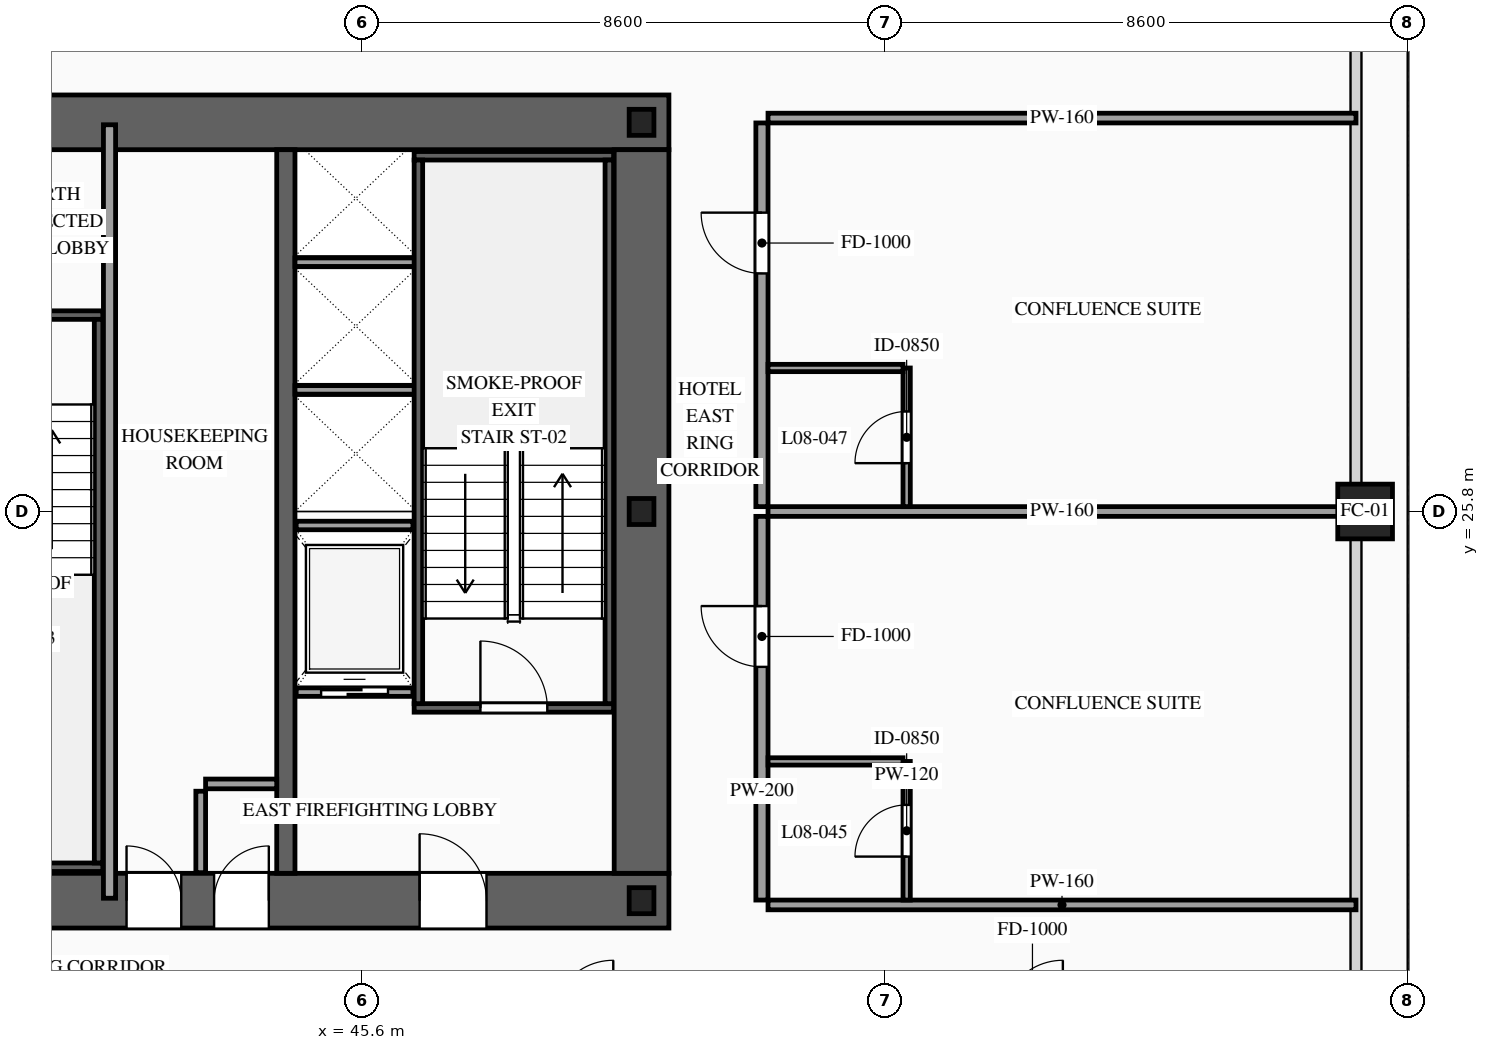
"""IFC4 building model, lengths in metres.
Left out: names, types, materials, properties, quantities, classifications, styles, units other than length and angle.
Written with IfcOpenShell. Run it as: python <this file> out.ifc"""

import sys

from ifc_helpers import new_model, si_unit, direction, frame, frame_2d, origin, origin_2d, place, context, subcontext, project, spatial, rectangle, hollow_rectangle, i_section, extrude, source, transform, mapped, element, fill, save


model = new_model("IFC4")
c1 = context("Model", 3, precision=1e-05, world=origin(), true_north=direction((0.0, 1.0)))
c2 = subcontext(c1, "Body", "Model", "MODEL_VIEW")
j1 = project(units=[si_unit("LENGTHUNIT", "METRE"), si_unit("PLANEANGLEUNIT", "RADIAN")], contexts=[c1])
p1 = place(None, origin())
s1 = spatial("IfcSite", under=j1, at=p1, CompositionType="ELEMENT")
p2 = place(p1, origin())
s2 = spatial("IfcBuilding", under=s1, at=p2, CompositionType="ELEMENT")
p3 = place(p2, frame((0.0, 0.0, 34.2)))
s3 = spatial("IfcBuildingStorey", under=s2, at=p3, CompositionType="ELEMENT", Elevation=34.2)
p4 = place(p3, frame((23.35, 19.4, 0.0), z_axis=(0.0, 0.0, 1.0), x_axis=(1.0, 0.0, 0.0)))
e1 = element("IfcWall", 1, at=p4, inside=s3, PredefinedType="SHEAR", context=c2, shape_type="SweptSolid", body=[
    extrude(rectangle(XDim=27.3, YDim=0.9, at=frame_2d((13.65, 0.0))), origin(), (0.0, 0.0, 1.0), 3.6),
])
p5 = place(p4, frame((2.1, 0.0, 0.0)))
e2 = element("IfcOpeningElement", 2, at=p5, cuts=e1, PredefinedType="OPENING", context=c2, shape_type="SweptSolid", body=[
    extrude(rectangle(XDim=1.1, YDim=2.2, at=frame_2d((0.55, 1.1))), frame((0.0, 0.465, 0.0), z_axis=(0.0, -1.0, 0.0), x_axis=(1.0, 0.0, 0.0)), (0.0, 0.0, 1.0), 0.93),
])
p6 = place(p4, frame((10.0, 0.0, 0.0)))
e3 = element("IfcOpeningElement", 3, at=p6, cuts=e1, PredefinedType="OPENING", context=c2, shape_type="SweptSolid", body=[
    extrude(rectangle(XDim=1.1, YDim=2.2, at=frame_2d((0.55, 1.1))), frame((0.0, 0.465, 0.0), z_axis=(0.0, -1.0, 0.0), x_axis=(1.0, 0.0, 0.0)), (0.0, 0.0, 1.0), 0.93),
])
p7 = place(p4, frame((23.2, 0.0, 0.0)))
e4 = element("IfcOpeningElement", 4, at=p7, cuts=e1, PredefinedType="OPENING", context=c2, shape_type="SweptSolid", body=[
    extrude(rectangle(XDim=1.1, YDim=2.2, at=frame_2d((0.55, 1.1))), frame((0.0, 0.465, 0.0), z_axis=(0.0, -1.0, 0.0), x_axis=(1.0, 0.0, 0.0)), (0.0, 0.0, 1.0), 0.93),
])
p8 = place(p4, frame((19.82, 0.0, 0.0)))
e5 = element("IfcOpeningElement", 5, at=p8, cuts=e1, PredefinedType="OPENING", context=c2, shape_type="SweptSolid", body=[
    extrude(rectangle(XDim=0.9, YDim=2.15, at=frame_2d((0.45, 1.075))), frame((0.0, 0.465, 0.0), z_axis=(0.0, -1.0, 0.0), x_axis=(1.0, 0.0, 0.0)), (0.0, 0.0, 1.0), 0.93),
])
p9 = place(p4, frame((18.38, 0.0, 0.0)))
e6 = element("IfcOpeningElement", 6, at=p9, cuts=e1, PredefinedType="OPENING", context=c2, shape_type="SweptSolid", body=[
    extrude(rectangle(XDim=0.9, YDim=2.15, at=frame_2d((0.45, 1.075))), frame((0.0, 0.465, 0.0), z_axis=(0.0, -1.0, 0.0), x_axis=(1.0, 0.0, 0.0)), (0.0, 0.0, 1.0), 0.93),
])
p10 = place(p3, frame((23.35, 32.2, 0.0), z_axis=(0.0, 0.0, 1.0), x_axis=(1.0, 0.0, 0.0)))
e7 = element("IfcWall", 7, at=p10, inside=s3, PredefinedType="SHEAR", context=c2, shape_type="SweptSolid", body=[
    extrude(rectangle(XDim=27.3, YDim=0.9, at=frame_2d((13.65, 0.0))), origin(), (0.0, 0.0, 1.0), 3.6),
])
p11 = place(p10, frame((4.72, 0.0, 0.0)))
e8 = element("IfcOpeningElement", 8, at=p11, cuts=e7, PredefinedType="OPENING", context=c2, shape_type="SweptSolid", body=[
    extrude(rectangle(XDim=0.9, YDim=2.15, at=frame_2d((0.45, 1.075))), frame((0.0, 0.465, 0.0), z_axis=(0.0, -1.0, 0.0), x_axis=(1.0, 0.0, 0.0)), (0.0, 0.0, 1.0), 0.93),
])
p12 = place(p10, frame((10.0, 0.0, 0.0)))
e9 = element("IfcOpeningElement", 9, at=p12, cuts=e7, PredefinedType="OPENING", context=c2, shape_type="SweptSolid", body=[
    extrude(rectangle(XDim=1.1, YDim=2.2, at=frame_2d((0.55, 1.1))), frame((0.0, 0.465, 0.0), z_axis=(0.0, -1.0, 0.0), x_axis=(1.0, 0.0, 0.0)), (0.0, 0.0, 1.0), 0.93),
])
p13 = place(p10, frame((15.85, 0.0, 0.0)))
e10 = element("IfcOpeningElement", 10, at=p13, cuts=e7, PredefinedType="OPENING", context=c2, shape_type="SweptSolid", body=[
    extrude(rectangle(XDim=1.1, YDim=2.2, at=frame_2d((0.55, 1.1))), frame((0.0, 0.465, 0.0), z_axis=(0.0, -1.0, 0.0), x_axis=(1.0, 0.0, 0.0)), (0.0, 0.0, 1.0), 0.93),
])
m1 = source(origin(), c2, "Body", "SweptSolid", [
    extrude(rectangle(XDim=11.9, YDim=0.9, at=frame_2d((5.95, 0.0))), origin(), (0.0, 0.0, 1.0), 3.6),
])
p14 = place(p3, frame((50.2, 19.85, 0.0), z_axis=(0.0, 0.0, 1.0), x_axis=(0.0, 1.0, 0.0)))
e11 = element("IfcWall", 11, at=p14, inside=s3, PredefinedType="SHEAR", context=c2, shape_type="MappedRepresentation", body=[
    mapped(m1, transform((0.0, 0.0, 0.0), scale=1.0)),
])
m2 = source(origin(), c2, "Body", "SweptSolid", [
    extrude(rectangle(XDim=11.9, YDim=0.3, at=frame_2d((5.95, 0.0))), origin(), (0.0, 0.0, 1.0), 3.6),
])
p15 = place(p3, frame((44.35, 19.85, 0.0), z_axis=(0.0, 0.0, 1.0), x_axis=(0.0, 1.0, 0.0)))
e12 = element("IfcWall", 12, at=p15, inside=s3, PredefinedType="SOLIDWALL", context=c2, shape_type="MappedRepresentation", body=[
    mapped(m2, transform((0.0, 0.0, 0.0), scale=1.0)),
])
m3 = source(origin(), c2, "Body", "SweptSolid", [
    extrude(i_section(OverallWidth=0.407, OverallDepth=0.428, WebThickness=0.02, FlangeThickness=0.035, at=origin_2d()), origin(), (0.0, 0.0, 1.0), 3.6),
])
for number, where, z_axis, x_axis in (
    (13, (50.2, 19.4, 0.0), (0.0, 0.0, 1.0), (1.0, 0.0, 0.0)),
    (14, (50.2, 25.8, 0.0), (0.0, 0.0, 1.0), (1.0, 0.0, 0.0)),
    (15, (50.2, 32.2, 0.0), (0.0, 0.0, 1.0), (1.0, 0.0, 0.0)),
):
    element("IfcColumn", number, at=place(p3, frame(where, z_axis=z_axis, x_axis=x_axis)), inside=s3, PredefinedType="COLUMN", context=c2, shape_type="MappedRepresentation", body=[
        mapped(m3, transform((0.0, 0.0, 0.0), scale=1.0)),
    ])
m4 = source(origin(), c2, "Body", "SweptSolid", [
    extrude(hollow_rectangle(XDim=0.9, YDim=0.9, WallThickness=0.042, at=origin_2d()), origin(), (0.0, 0.0, 1.0), 3.6),
])
p16 = place(p3, frame((62.1, 25.8, 0.0), z_axis=(0.0, 0.0, 1.0), x_axis=(1.0, 0.0, 0.0)))
e16 = element("IfcColumn", 16, at=p16, inside=s3, PredefinedType="COLUMN", context=c2, shape_type="MappedRepresentation", body=[
    mapped(m4, transform((0.0, 0.0, 0.0), scale=1.0)),
])
p17 = place(p3, frame((44.52, 22.83, 0.0), z_axis=(0.0, 0.0, 1.0), x_axis=(1.0, 0.0, 0.0)))
e17 = element("IfcWall", 17, at=p17, inside=s3, PredefinedType="SOLIDWALL", context=c2, shape_type="SweptSolid", body=[
    extrude(rectangle(XDim=1.92, YDim=0.14, at=frame_2d((0.96, 0.0))), origin(), (0.0, 0.0, 1.0), 3.38),
])
p18 = place(p17, frame((0.41, 0.0, 0.0)))
e18 = element("IfcOpeningElement", 18, at=p18, cuts=e17, PredefinedType="OPENING", context=c2, shape_type="SweptSolid", body=[
    extrude(rectangle(XDim=1.1, YDim=2.2, at=frame_2d((0.55, 1.1))), frame((0.0, 0.085, 0.0), z_axis=(0.0, -1.0, 0.0), x_axis=(1.0, 0.0, 0.0)), (0.0, 0.0, 1.0), 0.17),
])
m5 = source(origin(), c2, "Body", "SweptSolid", [
    extrude(rectangle(XDim=1.92, YDim=0.14, at=frame_2d((0.96, 0.0))), origin(), (0.0, 0.0, 1.0), 3.38),
])
p19 = place(p3, frame((44.52, 25.57, 0.0), z_axis=(0.0, 0.0, 1.0), x_axis=(1.0, 0.0, 0.0)))
e19 = element("IfcWall", 19, at=p19, inside=s3, PredefinedType="SOLIDWALL", context=c2, shape_type="MappedRepresentation", body=[
    mapped(m5, transform((0.0, 0.0, 0.0), scale=1.0)),
])
m6 = source(origin(), c2, "Body", "SweptSolid", [
    extrude(rectangle(XDim=2.0, YDim=0.14, at=frame_2d((1.0, 0.0))), origin(), (0.0, 0.0, 1.0), 3.38),
])
for number, where, z_axis, x_axis in (
    (20, (44.5, 27.8, 0.0), (0.0, 0.0, 1.0), (1.0, 0.0, 0.0)),
    (21, (44.5, 29.9, 0.0), (0.0, 0.0, 1.0), (1.0, 0.0, 0.0)),
):
    element("IfcWall", number, at=place(p3, frame(where, z_axis=z_axis, x_axis=x_axis)), inside=s3, PredefinedType="SOLIDWALL", context=c2, shape_type="MappedRepresentation", body=[
        mapped(m6, transform((0.0, 0.0, 0.0), scale=1.0)),
    ])
p20 = place(p3, frame((46.46, 22.57, 0.0), z_axis=(0.0, 0.0, 1.0), x_axis=(1.0, 0.0, 0.0)))
e22 = element("IfcWall", 22, at=p20, inside=s3, PredefinedType="SOLIDWALL", context=c2, shape_type="SweptSolid", body=[
    extrude(rectangle(XDim=3.28, YDim=0.14, at=frame_2d((1.64, 0.0))), origin(), (0.0, 0.0, 1.0), 3.38),
])
p21 = place(p20, frame((1.09, 0.0, 0.0)))
e23 = element("IfcOpeningElement", 23, at=p21, cuts=e22, PredefinedType="OPENING", context=c2, shape_type="SweptSolid", body=[
    extrude(rectangle(XDim=1.1, YDim=2.2, at=frame_2d((0.55, 1.1))), frame((0.0, 0.085, 0.0), z_axis=(0.0, -1.0, 0.0), x_axis=(1.0, 0.0, 0.0)), (0.0, 0.0, 1.0), 0.17),
])
m7 = source(origin(), c2, "Body", "SweptSolid", [
    extrude(rectangle(XDim=3.28, YDim=0.14, at=frame_2d((1.64, 0.0))), origin(), (0.0, 0.0, 1.0), 3.38),
])
p22 = place(p3, frame((46.46, 31.65, 0.0), z_axis=(0.0, 0.0, 1.0), x_axis=(1.0, 0.0, 0.0)))
e24 = element("IfcWall", 24, at=p22, inside=s3, PredefinedType="SOLIDWALL", context=c2, shape_type="MappedRepresentation", body=[
    mapped(m7, transform((0.0, 0.0, 0.0), scale=1.0)),
])
m8 = source(origin(), c2, "Body", "SweptSolid", [
    extrude(rectangle(XDim=8.94, YDim=0.14, at=frame_2d((4.47, 0.0))), origin(), (0.0, 0.0, 1.0), 3.38),
])
for number, where, z_axis, x_axis in (
    (25, (46.53, 22.64, 0.0), (0.0, 0.0, 1.0), (0.0, 1.0, 0.0)),
    (26, (49.67, 22.64, 0.0), (0.0, 0.0, 1.0), (0.0, 1.0, 0.0)),
):
    element("IfcWall", number, at=place(p3, frame(where, z_axis=z_axis, x_axis=x_axis)), inside=s3, PredefinedType="SOLIDWALL", context=c2, shape_type="MappedRepresentation", body=[
        mapped(m8, transform((0.0, 0.0, 0.0), scale=1.0)),
    ])
p23 = place(p3, frame((38.2, 29.03, 0.0), z_axis=(0.0, 0.0, 1.0), x_axis=(1.0, 0.0, 0.0)))
e27 = element("IfcWall", 27, at=p23, inside=s3, PredefinedType="SOLIDWALL", context=c2, shape_type="SweptSolid", body=[
    extrude(rectangle(XDim=3.14, YDim=0.14, at=frame_2d((1.57, 0.0))), origin(), (0.0, 0.0, 1.0), 3.38),
])
p24 = place(p23, frame((1.02, 0.0, 0.0)))
e28 = element("IfcOpeningElement", 28, at=p24, cuts=e27, PredefinedType="OPENING", context=c2, shape_type="SweptSolid", body=[
    extrude(rectangle(XDim=1.1, YDim=2.2, at=frame_2d((0.55, 1.1))), frame((0.0, 0.085, 0.0), z_axis=(0.0, -1.0, 0.0), x_axis=(1.0, 0.0, 0.0)), (0.0, 0.0, 1.0), 0.17),
])
m9 = source(origin(), c2, "Body", "SweptSolid", [
    extrude(rectangle(XDim=3.14, YDim=0.14, at=frame_2d((1.57, 0.0))), origin(), (0.0, 0.0, 1.0), 3.38),
])
p25 = place(p3, frame((38.2, 19.95, 0.0), z_axis=(0.0, 0.0, 1.0), x_axis=(1.0, 0.0, 0.0)))
e29 = element("IfcWall", 29, at=p25, inside=s3, PredefinedType="SOLIDWALL", context=c2, shape_type="MappedRepresentation", body=[
    mapped(m9, transform((0.0, 0.0, 0.0), scale=1.0)),
])
m10 = source(origin(), c2, "Body", "SweptSolid", [
    extrude(rectangle(XDim=8.94, YDim=0.14, at=frame_2d((4.47, 0.0))), origin(), (0.0, 0.0, 1.0), 3.38),
])
p26 = place(p3, frame((41.27, 20.02, 0.0), z_axis=(0.0, 0.0, 1.0), x_axis=(0.0, 1.0, 0.0)))
e30 = element("IfcWall", 30, at=p26, inside=s3, PredefinedType="SOLIDWALL", context=c2, shape_type="MappedRepresentation", body=[
    mapped(m10, transform((0.0, 0.0, 0.0), scale=1.0)),
])
m11 = source(origin(), c2, "Body", "SweptSolid", [
    extrude(rectangle(XDim=1.34, YDim=0.16, at=frame_2d((0.67, 0.0))), origin(), (0.0, 0.0, 1.0), 3.38),
])
p27 = place(p3, frame((42.95, 19.86, 0.0), z_axis=(0.0, 0.0, 1.0), x_axis=(0.0, 1.0, 0.0)))
e31 = element("IfcWall", 31, at=p27, inside=s3, PredefinedType="PARTITIONING", context=c2, shape_type="MappedRepresentation", body=[
    mapped(m11, transform((0.0, 0.0, 0.0), scale=1.0)),
])
m12 = source(origin(), c2, "Body", "SweptSolid", [
    extrude(rectangle(XDim=1.17, YDim=0.16, at=frame_2d((0.585, 0.0))), origin(), (0.0, 0.0, 1.0), 3.38),
])
p28 = place(p3, frame((43.03, 21.32, 0.0), z_axis=(0.0, 0.0, 1.0), x_axis=(1.0, 0.0, 0.0)))
e32 = element("IfcWall", 32, at=p28, inside=s3, PredefinedType="PARTITIONING", context=c2, shape_type="MappedRepresentation", body=[
    mapped(m12, transform((0.0, 0.0, 0.0), scale=1.0)),
])
m13 = source(origin(), c2, "Body", "SweptSolid", [
    extrude(rectangle(XDim=12.72, YDim=0.2, at=frame_2d((6.36, 0.0))), origin(), (0.0, 0.0, 1.0), 3.38),
])
p29 = place(p3, frame((41.45, 19.44, 0.0), z_axis=(0.0, 0.0, 1.0), x_axis=(0.0, 1.0, 0.0)))
e33 = element("IfcWall", 33, at=p29, inside=s3, PredefinedType="PARTITIONING", context=c2, shape_type="MappedRepresentation", body=[
    mapped(m13, transform((0.0, 0.0, 0.0), scale=1.0)),
])
p30 = place(p3, frame((52.18, 19.41, 0.0), z_axis=(0.0, 0.0, 1.0), x_axis=(0.0, 1.0, 0.0)))
e34 = element("IfcWall", 34, at=p30, inside=s3, PredefinedType="PARTITIONING", context=c2, shape_type="SweptSolid", body=[
    extrude(rectangle(XDim=6.31, YDim=0.2, at=frame_2d((3.155, 0.0))), origin(), (0.0, 0.0, 1.0), 3.38),
])
p31 = place(p30, frame((3.835, 0.0, 0.0)))
e35 = element("IfcOpeningElement", 35, at=p31, cuts=e34, PredefinedType="OPENING", context=c2, shape_type="SweptSolid", body=[
    extrude(rectangle(XDim=1.0, YDim=2.2, at=frame_2d((0.5, 1.1))), frame((0.0, 0.115, 0.0), z_axis=(0.0, -1.0, 0.0), x_axis=(1.0, 0.0, 0.0)), (0.0, 0.0, 1.0), 0.23),
])
m14 = source(origin(), c2, "Body", "SweptSolid", [
    extrude(rectangle(XDim=9.67, YDim=0.16, at=frame_2d((4.835, 0.0))), origin(), (0.0, 0.0, 1.0), 2.575),
])
p32 = place(p3, frame((52.28, 25.8, 0.0), z_axis=(0.0, 0.0, 1.0), x_axis=(1.0, 0.0, 0.0)))
e36 = element("IfcWall", 36, at=p32, inside=s3, PredefinedType="PARTITIONING", context=c2, shape_type="MappedRepresentation", body=[
    mapped(m14, transform((0.0, 0.0, 0.0), scale=1.0)),
])
m15 = source(origin(), c2, "Body", "SweptSolid", [
    extrude(rectangle(XDim=9.67, YDim=0.16, at=frame_2d((4.835, 0.0))), origin(), (0.0, 0.0, 1.0), 2.875),
])
p33 = place(p3, frame((52.28, 19.33, 0.0), z_axis=(0.0, 0.0, 1.0), x_axis=(1.0, 0.0, 0.0)))
e37 = element("IfcWall", 37, at=p33, inside=s3, PredefinedType="PARTITIONING", context=c2, shape_type="MappedRepresentation", body=[
    mapped(m15, transform((0.0, 0.0, 0.0), scale=1.0)),
])
p34 = place(p3, frame((54.56, 19.41, 0.0), z_axis=(0.0, 0.0, 1.0), x_axis=(0.0, 1.0, 0.0)))
e38 = element("IfcWall", 38, at=p34, inside=s3, PredefinedType="PARTITIONING", context=c2, shape_type="SweptSolid", body=[
    extrude(rectangle(XDim=2.28, YDim=0.12, at=frame_2d((1.14, 0.0))), origin(), (0.0, 0.0, 1.0), 3.38),
])
p35 = place(p34, frame((0.715, 0.0, 0.0)))
e39 = element("IfcOpeningElement", 39, at=p35, cuts=e38, PredefinedType="OPENING", context=c2, shape_type="SweptSolid", body=[
    extrude(rectangle(XDim=0.85, YDim=2.1, at=frame_2d((0.425, 1.05))), frame((0.0, 0.075, 0.0), z_axis=(0.0, -1.0, 0.0), x_axis=(1.0, 0.0, 0.0)), (0.0, 0.0, 1.0), 0.15),
])
m16 = source(origin(), c2, "Body", "SweptSolid", [
    extrude(rectangle(XDim=2.22, YDim=0.12, at=frame_2d((1.11, 0.0))), origin(), (0.0, 0.0, 1.0), 3.38),
])
p36 = place(p3, frame((52.28, 21.69, 0.0), z_axis=(0.0, 0.0, 1.0), x_axis=(1.0, 0.0, 0.0)))
e40 = element("IfcWall", 40, at=p36, inside=s3, PredefinedType="PARTITIONING", context=c2, shape_type="MappedRepresentation", body=[
    mapped(m16, transform((0.0, 0.0, 0.0), scale=1.0)),
])
p37 = place(p3, frame((52.18, 25.88, 0.0), z_axis=(0.0, 0.0, 1.0), x_axis=(0.0, 1.0, 0.0)))
e41 = element("IfcWall", 41, at=p37, inside=s3, PredefinedType="PARTITIONING", context=c2, shape_type="SweptSolid", body=[
    extrude(rectangle(XDim=6.31, YDim=0.2, at=frame_2d((3.155, 0.0))), origin(), (0.0, 0.0, 1.0), 3.38),
])
p38 = place(p37, frame((3.835, 0.0, 0.0)))
e42 = element("IfcOpeningElement", 42, at=p38, cuts=e41, PredefinedType="OPENING", context=c2, shape_type="SweptSolid", body=[
    extrude(rectangle(XDim=1.0, YDim=2.2, at=frame_2d((0.5, 1.1))), frame((0.0, 0.115, 0.0), z_axis=(0.0, -1.0, 0.0), x_axis=(1.0, 0.0, 0.0)), (0.0, 0.0, 1.0), 0.23),
])
p39 = place(p3, frame((52.28, 32.27, 0.0), z_axis=(0.0, 0.0, 1.0), x_axis=(1.0, 0.0, 0.0)))
e43 = element("IfcWall", 43, at=p39, inside=s3, PredefinedType="PARTITIONING", context=c2, shape_type="MappedRepresentation", body=[
    mapped(m15, transform((0.0, 0.0, 0.0), scale=1.0)),
])
p40 = place(p3, frame((54.56, 25.88, 0.0), z_axis=(0.0, 0.0, 1.0), x_axis=(0.0, 1.0, 0.0)))
e44 = element("IfcWall", 44, at=p40, inside=s3, PredefinedType="PARTITIONING", context=c2, shape_type="SweptSolid", body=[
    extrude(rectangle(XDim=2.28, YDim=0.12, at=frame_2d((1.14, 0.0))), origin(), (0.0, 0.0, 1.0), 3.38),
])
p41 = place(p40, frame((0.715, 0.0, 0.0)))
e45 = element("IfcOpeningElement", 45, at=p41, cuts=e44, PredefinedType="OPENING", context=c2, shape_type="SweptSolid", body=[
    extrude(rectangle(XDim=0.85, YDim=2.1, at=frame_2d((0.425, 1.05))), frame((0.0, 0.075, 0.0), z_axis=(0.0, -1.0, 0.0), x_axis=(1.0, 0.0, 0.0)), (0.0, 0.0, 1.0), 0.15),
])
p42 = place(p3, frame((52.28, 28.16, 0.0), z_axis=(0.0, 0.0, 1.0), x_axis=(1.0, 0.0, 0.0)))
e46 = element("IfcWall", 46, at=p42, inside=s3, PredefinedType="PARTITIONING", context=c2, shape_type="MappedRepresentation", body=[
    mapped(m16, transform((0.0, 0.0, 0.0), scale=1.0)),
])
m17 = source(origin(), c2, "Body", "SweptSolid", [
    extrude(rectangle(XDim=1.1, YDim=2.2, at=frame_2d((0.55, 1.1))), frame((0.0, 0.025, 0.0), z_axis=(0.0, -1.0, 0.0), x_axis=(1.0, 0.0, 0.0)), (0.0, 0.0, 1.0), 0.05),
])
p43 = place(p18, origin())
e47 = element("IfcDoor", 47, at=p43, inside=s3, OperationType="SLIDING_TO_RIGHT", PredefinedType="DOOR", context=c2, shape_type="MappedRepresentation", body=[
    mapped(m17, transform((0.0, 0.0, 0.0), scale=1.0)),
])
fill(e18, e47)
m18 = source(origin(), c2, "Body", "SweptSolid", [
    extrude(rectangle(XDim=1.1, YDim=2.2, at=frame_2d((0.55, 1.1))), frame((0.0, 0.025, 0.0), z_axis=(0.0, -1.0, 0.0), x_axis=(1.0, 0.0, 0.0)), (0.0, 0.0, 1.0), 0.05),
])
p44 = place(p21, origin())
e48 = element("IfcDoor", 48, at=p44, inside=s3, OperationType="SINGLE_SWING_LEFT", PredefinedType="DOOR", context=c2, shape_type="MappedRepresentation", body=[
    mapped(m18, transform((0.0, 0.0, 0.0), scale=1.0)),
])
fill(e23, e48)
p45 = place(p7, origin())
e49 = element("IfcDoor", 49, at=p45, inside=s3, OperationType="SINGLE_SWING_LEFT", PredefinedType="DOOR", context=c2, shape_type="MappedRepresentation", body=[
    mapped(m18, transform((0.0, 0.0, 0.0), scale=1.0)),
])
fill(e4, e49)
m19 = source(origin(), c2, "Body", "SweptSolid", [
    extrude(rectangle(XDim=0.9, YDim=2.15, at=frame_2d((0.45, 1.075))), frame((0.0, 0.025, 0.0), z_axis=(0.0, -1.0, 0.0), x_axis=(1.0, 0.0, 0.0)), (0.0, 0.0, 1.0), 0.05),
])
p46 = place(p8, origin())
e50 = element("IfcDoor", 50, at=p46, inside=s3, OperationType="SINGLE_SWING_RIGHT", PredefinedType="DOOR", context=c2, shape_type="MappedRepresentation", body=[
    mapped(m19, transform((0.0, 0.0, 0.0), scale=1.0)),
])
fill(e5, e50)
p47 = place(p9, origin())
e51 = element("IfcDoor", 51, at=p47, inside=s3, OperationType="SINGLE_SWING_LEFT", PredefinedType="DOOR", context=c2, shape_type="MappedRepresentation", body=[
    mapped(m19, transform((0.0, 0.0, 0.0), scale=1.0)),
])
fill(e6, e51)
m20 = source(origin(), c2, "Body", "SweptSolid", [
    extrude(rectangle(XDim=1.0, YDim=2.2, at=frame_2d((0.5, 1.1))), frame((0.0, 0.025, 0.0), z_axis=(0.0, -1.0, 0.0), x_axis=(1.0, 0.0, 0.0)), (0.0, 0.0, 1.0), 0.05),
])
p48 = place(p31, origin())
e52 = element("IfcDoor", 52, at=p48, inside=s3, OperationType="SINGLE_SWING_RIGHT", PredefinedType="DOOR", context=c2, shape_type="MappedRepresentation", body=[
    mapped(m20, transform((0.0, 0.0, 0.0), scale=1.0)),
])
fill(e35, e52)
m21 = source(origin(), c2, "Body", "SweptSolid", [
    extrude(rectangle(XDim=0.85, YDim=2.1, at=frame_2d((0.425, 1.05))), frame((0.0, 0.025, 0.0), z_axis=(0.0, -1.0, 0.0), x_axis=(1.0, 0.0, 0.0)), (0.0, 0.0, 1.0), 0.05),
])
p49 = place(p35, origin())
e53 = element("IfcDoor", 53, at=p49, inside=s3, OperationType="SINGLE_SWING_LEFT", PredefinedType="DOOR", context=c2, shape_type="MappedRepresentation", body=[
    mapped(m21, transform((0.0, 0.0, 0.0), scale=1.0)),
])
fill(e39, e53)
p50 = place(p38, origin())
e54 = element("IfcDoor", 54, at=p50, inside=s3, OperationType="SINGLE_SWING_RIGHT", PredefinedType="DOOR", context=c2, shape_type="MappedRepresentation", body=[
    mapped(m20, transform((0.0, 0.0, 0.0), scale=1.0)),
])
fill(e42, e54)
p51 = place(p41, origin())
e55 = element("IfcDoor", 55, at=p51, inside=s3, OperationType="SINGLE_SWING_LEFT", PredefinedType="DOOR", context=c2, shape_type="MappedRepresentation", body=[
    mapped(m21, transform((0.0, 0.0, 0.0), scale=1.0)),
])
fill(e45, e55)
save(model, sys.argv[1])
